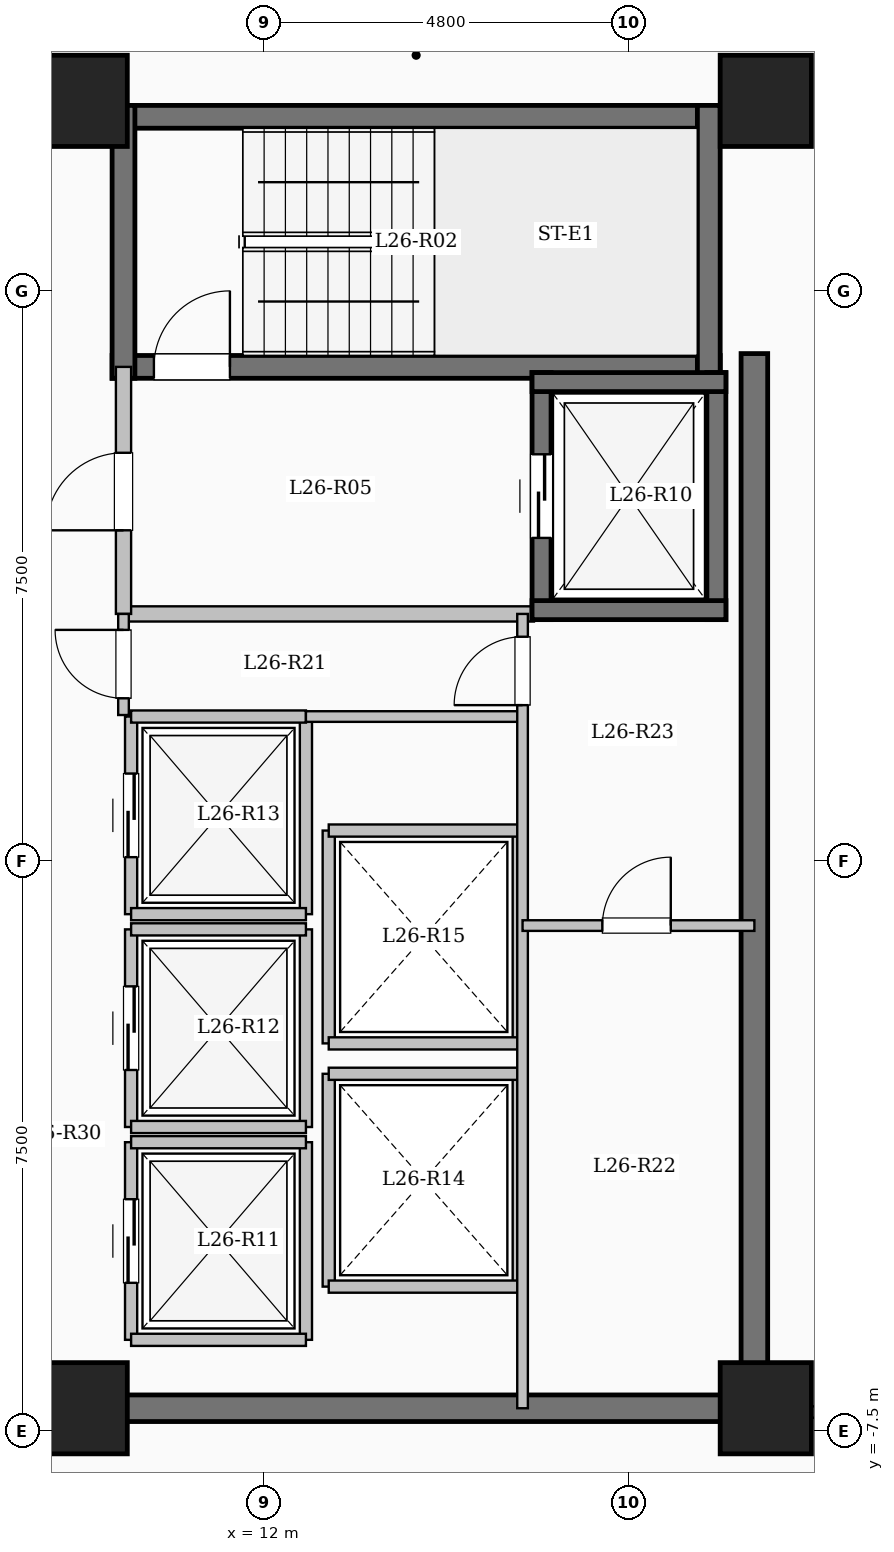
"""IFC4 building model, lengths in metres.
Left out: names, types, materials, properties, quantities, classifications, styles, units other than length and angle.
Written with IfcOpenShell. Run it as: python <this file> out.ifc"""

import sys

from ifc_helpers import new_model, si_unit, direction, frame, frame_2d, origin, origin_2d, place, context, subcontext, project, spatial, rectangle, extrude, element, fill, save


model = new_model("IFC4")
c1 = context("Model", 3, precision=1e-05, world=origin(), true_north=direction((0.0, 1.0)))
c2 = subcontext(c1, "Body", "Model", "MODEL_VIEW")
j1 = project(units=[si_unit("LENGTHUNIT", "METRE"), si_unit("PLANEANGLEUNIT", "RADIAN")], contexts=[c1])
p1 = place(None, origin())
s1 = spatial("IfcSite", under=j1, at=p1, CompositionType="ELEMENT")
p2 = place(p1, origin())
s2 = spatial("IfcBuilding", under=s1, at=p2, CompositionType="ELEMENT")
p3 = place(p2, frame((0.0, 0.0, 98.4)))
s3 = spatial("IfcBuildingStorey", under=s2, at=p3, CompositionType="ELEMENT", Elevation=98.4)
for number, where, z_axis, x_axis in (
    (1, (9.6, -7.2, 0.0), (0.0, 0.0, 1.0), (1.0, 0.0, 0.0)),
    (2, (9.6, 10.0, 0.0), (0.0, 0.0, 1.0), (1.0, 0.0, 0.0)),
    (3, (18.6, -7.2, 0.0), (0.0, 0.0, 1.0), (1.0, 0.0, 0.0)),
    (4, (18.6, 10.0, 0.0), (0.0, 0.0, 1.0), (1.0, 0.0, 0.0)),
):
    element("IfcColumn", number, at=place(p3, frame(where, z_axis=z_axis, x_axis=x_axis)), inside=s3, PredefinedType="COLUMN", context=c2, shape_type="SweptSolid", body=[
        extrude(rectangle(XDim=1.2, YDim=1.2, at=origin_2d()), origin(), (0.0, 0.0, 1.0), 3.35),
    ])
p4 = place(p3, frame((10.0, 9.79, 0.0), z_axis=(0.0, 0.0, 1.0), x_axis=(1.0, 0.0, 0.0)))
e5 = element("IfcWall", 5, at=p4, inside=s3, PredefinedType="SHEAR", context=c2, shape_type="SweptSolid", body=[
    extrude(rectangle(XDim=8.0, YDim=0.3, at=frame_2d((4.0, 0.0))), origin(), (0.0, 0.0, 1.0), 3.35),
])
p5 = place(p3, frame((10.0, 6.5, 0.0), z_axis=(0.0, 0.0, 1.0), x_axis=(1.0, 0.0, 0.0)))
e6 = element("IfcWall", 6, at=p5, inside=s3, PredefinedType="SHEAR", context=c2, shape_type="SweptSolid", body=[
    extrude(rectangle(XDim=8.0, YDim=0.3, at=frame_2d((4.0, 0.0))), origin(), (0.0, 0.0, 1.0), 3.35),
])
p6 = place(p5, frame((0.55, 0.0, 0.0)))
e7 = element("IfcOpeningElement", 7, at=p6, cuts=e6, PredefinedType="OPENING", context=c2, shape_type="SweptSolid", body=[
    extrude(rectangle(XDim=1.0, YDim=2.15, at=frame_2d((0.5, 1.075))), frame((0.0, 0.16, 0.0), z_axis=(0.0, -1.0, 0.0), x_axis=(1.0, 0.0, 0.0)), (0.0, 0.0, 1.0), 0.32),
])
for number, where, z_axis, x_axis in (
    (8, (10.15, 6.35, 0.0), (0.0, 0.0, 1.0), (0.0, 1.0, 0.0)),
    (9, (17.85, 6.35, 0.0), (0.0, 0.0, 1.0), (0.0, 1.0, 0.0)),
):
    element("IfcWall", number, at=place(p3, frame(where, z_axis=z_axis, x_axis=x_axis)), inside=s3, PredefinedType="SHEAR", context=c2, shape_type="SweptSolid", body=[
        extrude(rectangle(XDim=3.59, YDim=0.3, at=frame_2d((1.795, 0.0))), origin(), (0.0, 0.0, 1.0), 3.35),
    ])
p7 = place(p3, frame((10.15, 3.25, 0.0), z_axis=(0.0, 0.0, 1.0), x_axis=(1.0, 0.0, 0.0)))
e10 = element("IfcWall", 10, at=p7, inside=s3, PredefinedType="SOLIDWALL", context=c2, shape_type="SweptSolid", body=[
    extrude(rectangle(XDim=5.4, YDim=0.2, at=frame_2d((2.7, 0.0))), origin(), (0.0, 0.0, 1.0), 3.1),
])
p8 = place(p3, frame((10.15, 3.25, 0.0), z_axis=(0.0, 0.0, 1.0), x_axis=(0.0, 1.0, 0.0)))
e11 = element("IfcWall", 11, at=p8, inside=s3, PredefinedType="SOLIDWALL", context=c2, shape_type="SweptSolid", body=[
    extrude(rectangle(XDim=3.25, YDim=0.2, at=frame_2d((1.625, 0.0))), origin(), (0.0, 0.0, 1.0), 3.1),
])
p9 = place(p8, frame((1.1, 0.0, 0.0)))
e12 = element("IfcOpeningElement", 12, at=p9, cuts=e11, PredefinedType="OPENING", context=c2, shape_type="SweptSolid", body=[
    extrude(rectangle(XDim=1.02, YDim=2.15, at=frame_2d((0.51, 1.075))), frame((0.0, 0.11, 0.0), z_axis=(0.0, -1.0, 0.0), x_axis=(1.0, 0.0, 0.0)), (0.0, 0.0, 1.0), 0.22),
])
p10 = place(p3, frame((15.65, 3.175, 0.0), z_axis=(0.0, 0.0, 1.0), x_axis=(0.0, 1.0, 0.0)))
e13 = element("IfcWall", 13, at=p10, inside=s3, PredefinedType="SHEAR", context=c2, shape_type="SweptSolid", body=[
    extrude(rectangle(XDim=3.25, YDim=0.25, at=frame_2d((1.625, 0.0))), origin(), (0.0, 0.0, 1.0), 3.35),
])
p11 = place(p10, frame((1.075, 0.0, 0.0)))
e14 = element("IfcOpeningElement", 14, at=p11, cuts=e13, PredefinedType="OPENING", context=c2, shape_type="SweptSolid", body=[
    extrude(rectangle(XDim=1.1, YDim=2.15, at=frame_2d((0.55, 1.075))), frame((0.0, 0.135, 0.0), z_axis=(0.0, -1.0, 0.0), x_axis=(1.0, 0.0, 0.0)), (0.0, 0.0, 1.0), 0.27),
])
p12 = place(p3, frame((17.95, 3.175, 0.0), z_axis=(0.0, 0.0, 1.0), x_axis=(0.0, 1.0, 0.0)))
e15 = element("IfcWall", 15, at=p12, inside=s3, PredefinedType="SHEAR", context=c2, shape_type="SweptSolid", body=[
    extrude(rectangle(XDim=3.25, YDim=0.25, at=frame_2d((1.625, 0.0))), origin(), (0.0, 0.0, 1.0), 3.35),
])
for number, where, z_axis, x_axis in (
    (16, (15.525, 3.3, 0.0), (0.0, 0.0, 1.0), (1.0, 0.0, 0.0)),
    (17, (15.525, 6.3, 0.0), (0.0, 0.0, 1.0), (1.0, 0.0, 0.0)),
):
    element("IfcWall", number, at=place(p3, frame(where, z_axis=z_axis, x_axis=x_axis)), inside=s3, PredefinedType="SHEAR", context=c2, shape_type="SweptSolid", body=[
        extrude(rectangle(XDim=2.55, YDim=0.25, at=frame_2d((1.275, 0.0))), origin(), (0.0, 0.0, 1.0), 3.35),
    ])
p13 = place(p3, frame((10.25, -6.3, 0.0), z_axis=(0.0, 0.0, 1.0), x_axis=(0.0, 1.0, 0.0)))
e18 = element("IfcWall", 18, at=p13, inside=s3, PredefinedType="SOLIDWALL", context=c2, shape_type="SweptSolid", body=[
    extrude(rectangle(XDim=2.6, YDim=0.16, at=frame_2d((1.3, 0.0))), origin(), (0.0, 0.0, 1.0), 3.1),
])
p14 = place(p13, frame((0.75, 0.0, 0.0)))
e19 = element("IfcOpeningElement", 19, at=p14, cuts=e18, PredefinedType="OPENING", context=c2, shape_type="SweptSolid", body=[
    extrude(rectangle(XDim=1.1, YDim=2.15, at=frame_2d((0.55, 1.075))), frame((0.0, 0.09, 0.0), z_axis=(0.0, -1.0, 0.0), x_axis=(1.0, 0.0, 0.0)), (0.0, 0.0, 1.0), 0.18),
])
p15 = place(p3, frame((12.55, -6.3, 0.0), z_axis=(0.0, 0.0, 1.0), x_axis=(0.0, 1.0, 0.0)))
e20 = element("IfcWall", 20, at=p15, inside=s3, PredefinedType="SOLIDWALL", context=c2, shape_type="SweptSolid", body=[
    extrude(rectangle(XDim=2.6, YDim=0.16, at=frame_2d((1.3, 0.0))), origin(), (0.0, 0.0, 1.0), 3.1),
])
for number, where, z_axis, x_axis in (
    (21, (10.25, -6.3, 0.0), (0.0, 0.0, 1.0), (1.0, 0.0, 0.0)),
    (22, (10.25, -3.7, 0.0), (0.0, 0.0, 1.0), (1.0, 0.0, 0.0)),
):
    element("IfcWall", number, at=place(p3, frame(where, z_axis=z_axis, x_axis=x_axis)), inside=s3, PredefinedType="SOLIDWALL", context=c2, shape_type="SweptSolid", body=[
        extrude(rectangle(XDim=2.3, YDim=0.16, at=frame_2d((1.15, 0.0))), origin(), (0.0, 0.0, 1.0), 3.1),
    ])
p16 = place(p3, frame((10.25, -3.5, 0.0), z_axis=(0.0, 0.0, 1.0), x_axis=(0.0, 1.0, 0.0)))
e23 = element("IfcWall", 23, at=p16, inside=s3, PredefinedType="SOLIDWALL", context=c2, shape_type="SweptSolid", body=[
    extrude(rectangle(XDim=2.6, YDim=0.16, at=frame_2d((1.3, 0.0))), origin(), (0.0, 0.0, 1.0), 3.1),
])
p17 = place(p16, frame((0.75, 0.0, 0.0)))
e24 = element("IfcOpeningElement", 24, at=p17, cuts=e23, PredefinedType="OPENING", context=c2, shape_type="SweptSolid", body=[
    extrude(rectangle(XDim=1.1, YDim=2.15, at=frame_2d((0.55, 1.075))), frame((0.0, 0.09, 0.0), z_axis=(0.0, -1.0, 0.0), x_axis=(1.0, 0.0, 0.0)), (0.0, 0.0, 1.0), 0.18),
])
p18 = place(p3, frame((12.55, -3.5, 0.0), z_axis=(0.0, 0.0, 1.0), x_axis=(0.0, 1.0, 0.0)))
e25 = element("IfcWall", 25, at=p18, inside=s3, PredefinedType="SOLIDWALL", context=c2, shape_type="SweptSolid", body=[
    extrude(rectangle(XDim=2.6, YDim=0.16, at=frame_2d((1.3, 0.0))), origin(), (0.0, 0.0, 1.0), 3.1),
])
for number, where, z_axis, x_axis in (
    (26, (10.25, -3.5, 0.0), (0.0, 0.0, 1.0), (1.0, 0.0, 0.0)),
    (27, (10.25, -0.9, 0.0), (0.0, 0.0, 1.0), (1.0, 0.0, 0.0)),
):
    element("IfcWall", number, at=place(p3, frame(where, z_axis=z_axis, x_axis=x_axis)), inside=s3, PredefinedType="SOLIDWALL", context=c2, shape_type="SweptSolid", body=[
        extrude(rectangle(XDim=2.3, YDim=0.16, at=frame_2d((1.15, 0.0))), origin(), (0.0, 0.0, 1.0), 3.1),
    ])
p19 = place(p3, frame((10.25, -0.7, 0.0), z_axis=(0.0, 0.0, 1.0), x_axis=(0.0, 1.0, 0.0)))
e28 = element("IfcWall", 28, at=p19, inside=s3, PredefinedType="SOLIDWALL", context=c2, shape_type="SweptSolid", body=[
    extrude(rectangle(XDim=2.6, YDim=0.16, at=frame_2d((1.3, 0.0))), origin(), (0.0, 0.0, 1.0), 3.1),
])
p20 = place(p19, frame((0.75, 0.0, 0.0)))
e29 = element("IfcOpeningElement", 29, at=p20, cuts=e28, PredefinedType="OPENING", context=c2, shape_type="SweptSolid", body=[
    extrude(rectangle(XDim=1.1, YDim=2.15, at=frame_2d((0.55, 1.075))), frame((0.0, 0.09, 0.0), z_axis=(0.0, -1.0, 0.0), x_axis=(1.0, 0.0, 0.0)), (0.0, 0.0, 1.0), 0.18),
])
p21 = place(p3, frame((12.55, -0.7, 0.0), z_axis=(0.0, 0.0, 1.0), x_axis=(0.0, 1.0, 0.0)))
e30 = element("IfcWall", 30, at=p21, inside=s3, PredefinedType="SOLIDWALL", context=c2, shape_type="SweptSolid", body=[
    extrude(rectangle(XDim=2.6, YDim=0.16, at=frame_2d((1.3, 0.0))), origin(), (0.0, 0.0, 1.0), 3.1),
])
for number, where, z_axis, x_axis in (
    (31, (10.25, -0.7, 0.0), (0.0, 0.0, 1.0), (1.0, 0.0, 0.0)),
    (32, (10.25, 1.9, 0.0), (0.0, 0.0, 1.0), (1.0, 0.0, 0.0)),
):
    element("IfcWall", number, at=place(p3, frame(where, z_axis=z_axis, x_axis=x_axis)), inside=s3, PredefinedType="SOLIDWALL", context=c2, shape_type="SweptSolid", body=[
        extrude(rectangle(XDim=2.3, YDim=0.16, at=frame_2d((1.15, 0.0))), origin(), (0.0, 0.0, 1.0), 3.1),
    ])
for number, where, z_axis, x_axis in (
    (33, (12.85, -5.6, 0.0), (0.0, 0.0, 1.0), (0.0, 1.0, 0.0)),
    (34, (15.35, -5.6, 0.0), (0.0, 0.0, 1.0), (0.0, 1.0, 0.0)),
):
    element("IfcWall", number, at=place(p3, frame(where, z_axis=z_axis, x_axis=x_axis)), inside=s3, PredefinedType="SOLIDWALL", context=c2, shape_type="SweptSolid", body=[
        extrude(rectangle(XDim=2.8, YDim=0.16, at=frame_2d((1.4, 0.0))), origin(), (0.0, 0.0, 1.0), 3.1),
    ])
for number, where, z_axis, x_axis in (
    (35, (12.85, -5.6, 0.0), (0.0, 0.0, 1.0), (1.0, 0.0, 0.0)),
    (36, (12.85, -2.8, 0.0), (0.0, 0.0, 1.0), (1.0, 0.0, 0.0)),
):
    element("IfcWall", number, at=place(p3, frame(where, z_axis=z_axis, x_axis=x_axis)), inside=s3, PredefinedType="SOLIDWALL", context=c2, shape_type="SweptSolid", body=[
        extrude(rectangle(XDim=2.5, YDim=0.16, at=frame_2d((1.25, 0.0))), origin(), (0.0, 0.0, 1.0), 3.1),
    ])
for number, where, z_axis, x_axis in (
    (37, (12.85, -2.4, 0.0), (0.0, 0.0, 1.0), (0.0, 1.0, 0.0)),
    (38, (15.35, -2.4, 0.0), (0.0, 0.0, 1.0), (0.0, 1.0, 0.0)),
):
    element("IfcWall", number, at=place(p3, frame(where, z_axis=z_axis, x_axis=x_axis)), inside=s3, PredefinedType="SOLIDWALL", context=c2, shape_type="SweptSolid", body=[
        extrude(rectangle(XDim=2.8, YDim=0.16, at=frame_2d((1.4, 0.0))), origin(), (0.0, 0.0, 1.0), 3.1),
    ])
for number, where, z_axis, x_axis in (
    (39, (12.85, -2.4, 0.0), (0.0, 0.0, 1.0), (1.0, 0.0, 0.0)),
    (40, (12.85, 0.4, 0.0), (0.0, 0.0, 1.0), (1.0, 0.0, 0.0)),
):
    element("IfcWall", number, at=place(p3, frame(where, z_axis=z_axis, x_axis=x_axis)), inside=s3, PredefinedType="SOLIDWALL", context=c2, shape_type="SweptSolid", body=[
        extrude(rectangle(XDim=2.5, YDim=0.16, at=frame_2d((1.25, 0.0))), origin(), (0.0, 0.0, 1.0), 3.1),
    ])
p22 = place(p3, frame((18.45, -7.375, 0.0), z_axis=(0.0, 0.0, 1.0), x_axis=(0.0, 1.0, 0.0)))
e41 = element("IfcWall", 41, at=p22, inside=s3, PredefinedType="SHEAR", context=c2, shape_type="SweptSolid", body=[
    extrude(rectangle(XDim=14.05, YDim=0.35, at=frame_2d((7.025, 0.0))), origin(), (0.0, 0.0, 1.0), 3.35),
])
p23 = place(p3, frame((10.075, -7.2, 0.0), z_axis=(0.0, 0.0, 1.0), x_axis=(1.0, 0.0, 0.0)))
e42 = element("IfcWall", 42, at=p23, inside=s3, PredefinedType="SHEAR", context=c2, shape_type="SweptSolid", body=[
    extrude(rectangle(XDim=8.55, YDim=0.35, at=frame_2d((4.275, 0.0))), origin(), (0.0, 0.0, 1.0), 3.35),
])
p24 = place(p3, frame((12.55, 1.9, 0.0), z_axis=(0.0, 0.0, 1.0), x_axis=(1.0, 0.0, 0.0)))
e43 = element("IfcWall", 43, at=p24, inside=s3, PredefinedType="PARTITIONING", context=c2, shape_type="SweptSolid", body=[
    extrude(rectangle(XDim=2.85, YDim=0.14, at=frame_2d((1.425, 0.0))), origin(), (0.0, 0.0, 1.0), 3.1),
])
p25 = place(p3, frame((10.15, 1.92, 0.0), z_axis=(0.0, 0.0, 1.0), x_axis=(0.0, 1.0, 0.0)))
e44 = element("IfcWall", 44, at=p25, inside=s3, PredefinedType="PARTITIONING", context=c2, shape_type="SweptSolid", body=[
    extrude(rectangle(XDim=1.33, YDim=0.14, at=frame_2d((0.665, 0.0))), origin(), (0.0, 0.0, 1.0), 3.1),
])
p26 = place(p25, frame((0.22, 0.0, 0.0)))
e45 = element("IfcOpeningElement", 45, at=p26, cuts=e44, PredefinedType="OPENING", context=c2, shape_type="SweptSolid", body=[
    extrude(rectangle(XDim=0.9, YDim=2.08, at=frame_2d((0.45, 1.04))), frame((0.0, 0.08, 0.0), z_axis=(0.0, -1.0, 0.0), x_axis=(1.0, 0.0, 0.0)), (0.0, 0.0, 1.0), 0.16),
])
p27 = place(p3, frame((15.4, -7.2, 0.0), z_axis=(0.0, 0.0, 1.0), x_axis=(0.0, 1.0, 0.0)))
e46 = element("IfcWall", 46, at=p27, inside=s3, PredefinedType="PARTITIONING", context=c2, shape_type="SweptSolid", body=[
    extrude(rectangle(XDim=10.45, YDim=0.14, at=frame_2d((5.225, 0.0))), origin(), (0.0, 0.0, 1.0), 3.1),
])
p28 = place(p27, frame((9.25, 0.0, 0.0)))
e47 = element("IfcOpeningElement", 47, at=p28, cuts=e46, PredefinedType="OPENING", context=c2, shape_type="SweptSolid", body=[
    extrude(rectangle(XDim=0.9, YDim=2.08, at=frame_2d((0.45, 1.04))), frame((0.0, 0.08, 0.0), z_axis=(0.0, -1.0, 0.0), x_axis=(1.0, 0.0, 0.0)), (0.0, 0.0, 1.0), 0.16),
])
p29 = place(p3, frame((15.4, -0.85, 0.0), z_axis=(0.0, 0.0, 1.0), x_axis=(1.0, 0.0, 0.0)))
e48 = element("IfcWall", 48, at=p29, inside=s3, PredefinedType="PARTITIONING", context=c2, shape_type="SweptSolid", body=[
    extrude(rectangle(XDim=3.05, YDim=0.14, at=frame_2d((1.525, 0.0))), origin(), (0.0, 0.0, 1.0), 3.1),
])
p30 = place(p29, frame((1.05, 0.0, 0.0)))
e49 = element("IfcOpeningElement", 49, at=p30, cuts=e48, PredefinedType="OPENING", context=c2, shape_type="SweptSolid", body=[
    extrude(rectangle(XDim=0.9, YDim=2.08, at=frame_2d((0.45, 1.04))), frame((0.0, 0.08, 0.0), z_axis=(0.0, -1.0, 0.0), x_axis=(1.0, 0.0, 0.0)), (0.0, 0.0, 1.0), 0.16),
])
p31 = place(p3, frame((18.45, -7.25, 0.0), z_axis=(0.0, 0.0, 1.0), x_axis=(1.0, 0.0, 0.0)))
e50 = element("IfcWall", 50, at=p31, inside=s3, PredefinedType="PARTITIONING", context=c2, shape_type="SweptSolid", body=[
    extrude(rectangle(XDim=8.43, YDim=0.15, at=frame_2d((4.215, 0.0))), origin(), (0.0, 0.0, 1.0), 3.1),
])
p32 = place(p31, frame((1.95, 0.0, 0.0)))
e51 = element("IfcOpeningElement", 51, at=p32, cuts=e50, PredefinedType="OPENING", context=c2, shape_type="SweptSolid", body=[
    extrude(rectangle(XDim=1.08, YDim=2.15, at=frame_2d((0.54, 1.075))), frame((0.0, 0.085, 0.0), z_axis=(0.0, -1.0, 0.0), x_axis=(1.0, 0.0, 0.0)), (0.0, 0.0, 1.0), 0.17),
])
p33 = place(p6, origin())
e52 = element("IfcDoor", 52, at=p33, inside=s3, OperationType="SINGLE_SWING_RIGHT", PredefinedType="DOOR", context=c2, shape_type="SweptSolid", body=[
    extrude(rectangle(XDim=1.0, YDim=2.15, at=frame_2d((0.5, 1.075))), frame((0.0, 0.025, 0.0), z_axis=(0.0, -1.0, 0.0), x_axis=(1.0, 0.0, 0.0)), (0.0, 0.0, 1.0), 0.05),
])
fill(e7, e52)
p34 = place(p9, origin())
e53 = element("IfcDoor", 53, at=p34, inside=s3, OperationType="SINGLE_SWING_LEFT", PredefinedType="DOOR", context=c2, shape_type="SweptSolid", body=[
    extrude(rectangle(XDim=1.02, YDim=2.15, at=frame_2d((0.51, 1.075))), frame((0.0, 0.025, 0.0), z_axis=(0.0, -1.0, 0.0), x_axis=(1.0, 0.0, 0.0)), (0.0, 0.0, 1.0), 0.05),
])
fill(e12, e53)
p35 = place(p11, origin())
e54 = element("IfcDoor", 54, at=p35, inside=s3, OperationType="SLIDING_TO_LEFT", PredefinedType="DOOR", context=c2, shape_type="SweptSolid", body=[
    extrude(rectangle(XDim=1.1, YDim=2.15, at=frame_2d((0.55, 1.075))), frame((0.0, 0.025, 0.0), z_axis=(0.0, -1.0, 0.0), x_axis=(1.0, 0.0, 0.0)), (0.0, 0.0, 1.0), 0.05),
])
fill(e14, e54)
p36 = place(p14, origin())
e55 = element("IfcDoor", 55, at=p36, inside=s3, OperationType="SLIDING_TO_LEFT", PredefinedType="DOOR", context=c2, shape_type="SweptSolid", body=[
    extrude(rectangle(XDim=1.1, YDim=2.15, at=frame_2d((0.55, 1.075))), frame((0.0, 0.025, 0.0), z_axis=(0.0, -1.0, 0.0), x_axis=(1.0, 0.0, 0.0)), (0.0, 0.0, 1.0), 0.05),
])
fill(e19, e55)
p37 = place(p17, origin())
e56 = element("IfcDoor", 56, at=p37, inside=s3, OperationType="SLIDING_TO_LEFT", PredefinedType="DOOR", context=c2, shape_type="SweptSolid", body=[
    extrude(rectangle(XDim=1.1, YDim=2.15, at=frame_2d((0.55, 1.075))), frame((0.0, 0.025, 0.0), z_axis=(0.0, -1.0, 0.0), x_axis=(1.0, 0.0, 0.0)), (0.0, 0.0, 1.0), 0.05),
])
fill(e24, e56)
p38 = place(p20, origin())
e57 = element("IfcDoor", 57, at=p38, inside=s3, OperationType="SLIDING_TO_LEFT", PredefinedType="DOOR", context=c2, shape_type="SweptSolid", body=[
    extrude(rectangle(XDim=1.1, YDim=2.15, at=frame_2d((0.55, 1.075))), frame((0.0, 0.025, 0.0), z_axis=(0.0, -1.0, 0.0), x_axis=(1.0, 0.0, 0.0)), (0.0, 0.0, 1.0), 0.05),
])
fill(e29, e57)
p39 = place(p26, origin())
e58 = element("IfcDoor", 58, at=p39, inside=s3, OperationType="SINGLE_SWING_RIGHT", PredefinedType="DOOR", context=c2, shape_type="SweptSolid", body=[
    extrude(rectangle(XDim=0.9, YDim=2.08, at=frame_2d((0.45, 1.04))), frame((0.0, 0.025, 0.0), z_axis=(0.0, -1.0, 0.0), x_axis=(1.0, 0.0, 0.0)), (0.0, 0.0, 1.0), 0.05),
])
fill(e45, e58)
p40 = place(p28, origin())
e59 = element("IfcDoor", 59, at=p40, inside=s3, OperationType="SINGLE_SWING_LEFT", PredefinedType="DOOR", context=c2, shape_type="SweptSolid", body=[
    extrude(rectangle(XDim=0.9, YDim=2.08, at=frame_2d((0.45, 1.04))), frame((0.0, 0.025, 0.0), z_axis=(0.0, -1.0, 0.0), x_axis=(1.0, 0.0, 0.0)), (0.0, 0.0, 1.0), 0.05),
])
fill(e47, e59)
p41 = place(p30, origin())
e60 = element("IfcDoor", 60, at=p41, inside=s3, OperationType="SINGLE_SWING_RIGHT", PredefinedType="DOOR", context=c2, shape_type="SweptSolid", body=[
    extrude(rectangle(XDim=0.9, YDim=2.08, at=frame_2d((0.45, 1.04))), frame((0.0, 0.025, 0.0), z_axis=(0.0, -1.0, 0.0), x_axis=(1.0, 0.0, 0.0)), (0.0, 0.0, 1.0), 0.05),
])
fill(e49, e60)
save(model, sys.argv[1])
